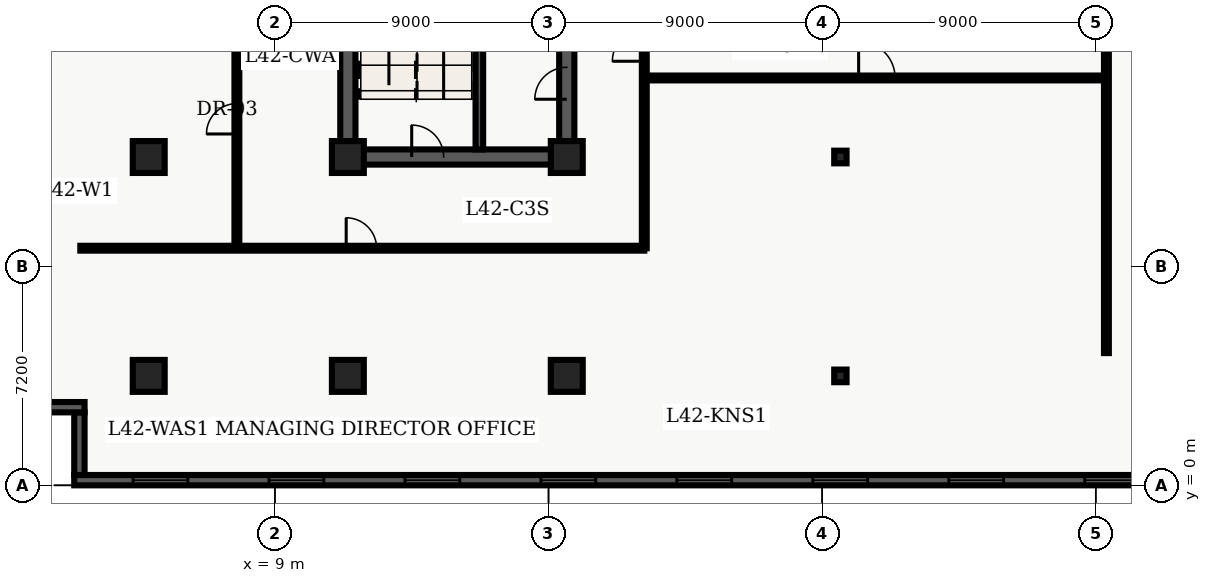
"""IFC4 building model, lengths in metres.
Left out: names, types, materials, properties, quantities, classifications, styles, units other than length and angle.
Written with IfcOpenShell. Run it as: python <this file> out.ifc"""

import sys

from ifc_helpers import new_model, entity, si_unit, converted_unit, direction, frame, origin_with_axes, origin_2d_with_axis, place, context, subcontext, project, spatial, polyline, rectangle, i_section, outline, extrude, element, fill, save


model = new_model("IFC4")
c1 = context("Model", 3, precision=1e-05, world=origin_with_axes(), true_north=direction((0.0, 1.0)))
c2 = subcontext(c1, "Body", "Model", "MODEL_VIEW")
j1 = project(units=[si_unit("LENGTHUNIT", "METRE"), converted_unit("PLANEANGLEUNIT", "DEGREE", entity("IfcPlaneAngleMeasure", 0.017), si_unit("PLANEANGLEUNIT", "RADIAN"), dimensions=[0, 0, 0, 0, 0, 0, 0])], contexts=[c1])
p1 = place(None, origin_with_axes())
s1 = spatial("IfcSite", under=j1, at=p1, CompositionType="ELEMENT")
p2 = place(p1, origin_with_axes())
s2 = spatial("IfcBuilding", under=s1, at=p2, CompositionType="ELEMENT")
p3 = place(p2, frame((0.0, 0.0, 171.9), z_axis=(0.0, 0.0, 1.0), x_axis=(1.0, 0.0, 0.0)))
s3 = spatial("IfcBuildingStorey", under=s2, at=p3, CompositionType="ELEMENT", Elevation=171.9)
p4 = place(p3, frame((11.4, 10.8, 0.0), z_axis=(0.0, 0.0, 1.0), x_axis=(0.0, 1.0, 0.0)))
e1 = element("IfcWall", 1, at=p4, inside=s3, PredefinedType="SHEAR", context=c2, shape_type="SweptSolid", body=[
    extrude(outline(polyline([(0.0, -0.25), (27.0, -0.25), (27.0, 0.25), (0.0, 0.25), (0.0, -0.25)])), origin_with_axes(), (0.0, 0.0, 1.0), 3.66),
])
p5 = place(p3, frame((11.4, 10.8, 0.0), z_axis=(0.0, 0.0, 1.0), x_axis=(1.0, 0.0, 0.0)))
e2 = element("IfcWall", 2, at=p5, inside=s3, PredefinedType="SHEAR", context=c2, shape_type="SweptSolid", body=[
    extrude(outline(polyline([(0.0, -0.25), (7.2, -0.25), (7.2, 0.25), (0.0, 0.25), (0.0, -0.25)])), origin_with_axes(), (0.0, 0.0, 1.0), 3.66),
])
p6 = place(p5, frame((2.625, 0.0, 0.0), z_axis=(0.0, 0.0, 1.0), x_axis=(1.0, 0.0, 0.0)))
e3 = element("IfcOpeningElement", 3, at=p6, cuts=e2, PredefinedType="OPENING", context=c2, shape_type="SweptSolid", body=[
    extrude(rectangle(XDim=1.05, YDim=0.52, at=origin_2d_with_axis()), origin_with_axes(), (0.0, 0.0, 1.0), 2.15),
])
p7 = place(p3, frame((18.6, 10.8, 0.0), z_axis=(0.0, 0.0, 1.0), x_axis=(0.0, 1.0, 0.0)))
e4 = element("IfcWall", 4, at=p7, inside=s3, PredefinedType="SHEAR", context=c2, shape_type="SweptSolid", body=[
    extrude(outline(polyline([(0.0, -0.25), (13.5, -0.25), (13.5, 0.25), (0.0, 0.25), (0.0, -0.25)])), origin_with_axes(), (0.0, 0.0, 1.0), 3.66),
])
p8 = place(p7, frame((11.125, 0.0, 0.0), z_axis=(0.0, 0.0, 1.0), x_axis=(1.0, 0.0, 0.0)))
e5 = element("IfcOpeningElement", 5, at=p8, cuts=e4, PredefinedType="OPENING", context=c2, shape_type="SweptSolid", body=[
    extrude(rectangle(XDim=1.05, YDim=0.52, at=origin_2d_with_axis()), origin_with_axes(), (0.0, 0.0, 1.0), 2.15),
])
p9 = place(p7, frame((2.425, 0.0, 0.0), z_axis=(0.0, 0.0, 1.0), x_axis=(1.0, 0.0, 0.0)))
e6 = element("IfcOpeningElement", 6, at=p9, cuts=e4, PredefinedType="OPENING", context=c2, shape_type="SweptSolid", body=[
    extrude(rectangle(XDim=1.05, YDim=0.52, at=origin_2d_with_axis()), origin_with_axes(), (0.0, 0.0, 1.0), 2.15),
])
p10 = place(p7, frame((6.725, 0.0, 0.0), z_axis=(0.0, 0.0, 1.0), x_axis=(1.0, 0.0, 0.0)))
e7 = element("IfcOpeningElement", 7, at=p10, cuts=e4, PredefinedType="OPENING", context=c2, shape_type="SweptSolid", body=[
    extrude(rectangle(XDim=1.05, YDim=0.52, at=origin_2d_with_axis()), origin_with_axes(), (0.0, 0.0, 1.0), 2.15),
])
p11 = place(p3, frame((15.725, 11.05, 0.0), z_axis=(0.0, 0.0, 1.0), x_axis=(0.0, 1.0, 0.0)))
e8 = element("IfcWall", 8, at=p11, inside=s3, PredefinedType="SHEAR", context=c2, shape_type="SweptSolid", body=[
    extrude(outline(polyline([(0.0, -0.125), (8.65, -0.125), (8.65, 0.125), (0.0, 0.125), (0.0, -0.125)])), origin_with_axes(), (0.0, 0.0, 1.0), 3.66),
])
for number, where, z_axis, x_axis in (
    (9, (11.4, 3.6, 0.0), (0.0, 0.0, 1.0), (1.0, 0.0, 0.0)),
    (10, (11.4, 10.8, 0.0), (0.0, 0.0, 1.0), (1.0, 0.0, 0.0)),
    (11, (18.6, 3.6, 0.0), (0.0, 0.0, 1.0), (1.0, 0.0, 0.0)),
    (12, (18.6, 10.8, 0.0), (0.0, 0.0, 1.0), (1.0, 0.0, 0.0)),
    (13, (4.85, 3.6, 0.0), (0.0, 0.0, 1.0), (1.0, 0.0, 0.0)),
    (14, (4.85, 10.8, 0.0), (0.0, 0.0, 1.0), (1.0, 0.0, 0.0)),
):
    element("IfcColumn", number, at=place(p3, frame(where, z_axis=z_axis, x_axis=x_axis)), inside=s3, PredefinedType="COLUMN", context=c2, shape_type="SweptSolid", body=[
        extrude(rectangle(XDim=1.05, YDim=1.05, at=origin_2d_with_axis()), origin_with_axes(), (0.0, 0.0, 1.0), 3.9),
    ])
for number, where, z_axis, x_axis in (
    (15, (27.6, 3.6, 0.0), (0.0, 0.0, 1.0), (1.0, 0.0, 0.0)),
    (16, (27.6, 10.8, 0.0), (0.0, 0.0, 1.0), (1.0, 0.0, 0.0)),
):
    element("IfcColumn", number, at=place(p3, frame(where, z_axis=z_axis, x_axis=x_axis)), inside=s3, PredefinedType="COLUMN", context=c2, shape_type="SweptSolid", body=[
        extrude(i_section(OverallWidth=0.406, OverallDepth=0.416, WebThickness=0.03, FlangeThickness=0.048, FilletRadius=0.022, at=origin_2d_with_axis()), origin_with_axes(), (0.0, 0.0, 1.0), 3.9),
    ])
p12 = place(p3, frame((2.6, 7.8, 0.0), z_axis=(0.0, 0.0, 1.0), x_axis=(1.0, 0.0, 0.0)))
e17 = element("IfcWall", 17, at=p12, inside=s3, PredefinedType="PARTITIONING", context=c2, shape_type="SweptSolid", body=[
    extrude(outline(polyline([(0.0, -0.08), (18.55, -0.08), (18.55, 0.08), (0.0, 0.08), (0.0, -0.08)])), origin_with_axes(), (0.0, 0.0, 1.0), 2.7),
])
p13 = place(p12, frame((9.245, 0.0, 0.0), z_axis=(0.0, 0.0, 1.0), x_axis=(1.0, 0.0, 0.0)))
e18 = element("IfcOpeningElement", 18, at=p13, cuts=e17, PredefinedType="OPENING", context=c2, shape_type="SweptSolid", body=[
    extrude(rectangle(XDim=1.0, YDim=0.18, at=origin_2d_with_axis()), origin_with_axes(), (0.0, 0.0, 1.0), 2.15),
])
p14 = place(p3, frame((21.15, 7.8, 0.0), z_axis=(0.0, 0.0, 1.0), x_axis=(0.0, 1.0, 0.0)))
e19 = element("IfcWall", 19, at=p14, inside=s3, PredefinedType="PARTITIONING", context=c2, shape_type="SweptSolid", body=[
    extrude(outline(polyline([(0.0, -0.08), (32.7, -0.08), (32.7, 0.08), (0.0, 0.08), (0.0, -0.08)])), origin_with_axes(), (0.0, 0.0, 1.0), 2.7),
])
p15 = place(p14, frame((15.766, 0.0, 0.0), z_axis=(0.0, 0.0, 1.0), x_axis=(1.0, 0.0, 0.0)))
e20 = element("IfcOpeningElement", 20, at=p15, cuts=e19, PredefinedType="OPENING", context=c2, shape_type="SweptSolid", body=[
    extrude(rectangle(XDim=1.0, YDim=0.18, at=origin_2d_with_axis()), origin_with_axes(), (0.0, 0.0, 1.0), 2.15),
])
p16 = place(p14, frame((19.696, 0.0, 0.0), z_axis=(0.0, 0.0, 1.0), x_axis=(1.0, 0.0, 0.0)))
e21 = element("IfcOpeningElement", 21, at=p16, cuts=e19, PredefinedType="OPENING", context=c2, shape_type="SweptSolid", body=[
    extrude(rectangle(XDim=1.0, YDim=0.18, at=origin_2d_with_axis()), origin_with_axes(), (0.0, 0.0, 1.0), 2.15),
])
p17 = place(p14, frame((24.223, 0.0, 0.0), z_axis=(0.0, 0.0, 1.0), x_axis=(1.0, 0.0, 0.0)))
e22 = element("IfcOpeningElement", 22, at=p17, cuts=e19, PredefinedType="OPENING", context=c2, shape_type="SweptSolid", body=[
    extrude(rectangle(XDim=1.0, YDim=0.18, at=origin_2d_with_axis()), origin_with_axes(), (0.0, 0.0, 1.0), 2.15),
])
p18 = place(p14, frame((29.613, 0.0, 0.0), z_axis=(0.0, 0.0, 1.0), x_axis=(1.0, 0.0, 0.0)))
e23 = element("IfcOpeningElement", 23, at=p18, cuts=e19, PredefinedType="OPENING", context=c2, shape_type="SweptSolid", body=[
    extrude(rectangle(XDim=1.0, YDim=0.18, at=origin_2d_with_axis()), origin_with_axes(), (0.0, 0.0, 1.0), 2.15),
])
p19 = place(p14, frame((6.675, 0.0, 0.0), z_axis=(0.0, 0.0, 1.0), x_axis=(1.0, 0.0, 0.0)))
e24 = element("IfcOpeningElement", 24, at=p19, cuts=e19, PredefinedType="OPENING", context=c2, shape_type="SweptSolid", body=[
    extrude(rectangle(XDim=1.05, YDim=0.18, at=origin_2d_with_axis()), origin_with_axes(), (0.0, 0.0, 1.0), 2.15),
])
p20 = place(p3, frame((7.75, 7.8, 0.0), z_axis=(0.0, 0.0, 1.0), x_axis=(0.0, 1.0, 0.0)))
e25 = element("IfcWall", 25, at=p20, inside=s3, PredefinedType="PARTITIONING", context=c2, shape_type="SweptSolid", body=[
    extrude(outline(polyline([(0.0, -0.08), (32.7, -0.08), (32.7, 0.08), (0.0, 0.08), (0.0, -0.08)])), origin_with_axes(), (0.0, 0.0, 1.0), 2.7),
])
p21 = place(p20, frame((4.258, 0.0, 0.0), z_axis=(0.0, 0.0, 1.0), x_axis=(1.0, 0.0, 0.0)))
e26 = element("IfcOpeningElement", 26, at=p21, cuts=e25, PredefinedType="OPENING", context=c2, shape_type="SweptSolid", body=[
    extrude(rectangle(XDim=1.0, YDim=0.18, at=origin_2d_with_axis()), origin_with_axes(), (0.0, 0.0, 1.0), 2.15),
])
p22 = place(p20, frame((13.551, 0.0, 0.0), z_axis=(0.0, 0.0, 1.0), x_axis=(1.0, 0.0, 0.0)))
e27 = element("IfcOpeningElement", 27, at=p22, cuts=e25, PredefinedType="OPENING", context=c2, shape_type="SweptSolid", body=[
    extrude(rectangle(XDim=1.0, YDim=0.18, at=origin_2d_with_axis()), origin_with_axes(), (0.0, 0.0, 1.0), 2.15),
])
p23 = place(p20, frame((25.643, 0.0, 0.0), z_axis=(0.0, 0.0, 1.0), x_axis=(1.0, 0.0, 0.0)))
e28 = element("IfcOpeningElement", 28, at=p23, cuts=e25, PredefinedType="OPENING", context=c2, shape_type="SweptSolid", body=[
    extrude(rectangle(XDim=1.0, YDim=0.18, at=origin_2d_with_axis()), origin_with_axes(), (0.0, 0.0, 1.0), 2.15),
])
p24 = place(p3, frame((21.15, 13.4, 0.0), z_axis=(0.0, 0.0, 1.0), x_axis=(1.0, 0.0, 0.0)))
e29 = element("IfcWall", 29, at=p24, inside=s3, PredefinedType="PARTITIONING", context=c2, shape_type="SweptSolid", body=[
    extrude(outline(polyline([(0.0, -0.08), (15.2, -0.08), (15.2, 0.08), (0.0, 0.08), (0.0, -0.08)])), origin_with_axes(), (0.0, 0.0, 1.0), 2.7),
])
p25 = place(p24, frame((7.65, 0.0, 0.0), z_axis=(0.0, 0.0, 1.0), x_axis=(1.0, 0.0, 0.0)))
e30 = element("IfcOpeningElement", 30, at=p25, cuts=e29, PredefinedType="OPENING", context=c2, shape_type="SweptSolid", body=[
    extrude(rectangle(XDim=1.2, YDim=0.18, at=origin_2d_with_axis()), origin_with_axes(), (0.0, 0.0, 1.0), 2.2),
])
p26 = place(p3, frame((36.35, 4.35, 0.0), z_axis=(0.0, 0.0, 1.0), x_axis=(0.0, 1.0, 0.0)))
e31 = element("IfcWall", 31, at=p26, inside=s3, PredefinedType="PARTITIONING", context=c2, shape_type="SweptSolid", body=[
    extrude(outline(polyline([(0.0, -0.08), (16.95, -0.08), (16.95, 0.08), (0.0, 0.08), (0.0, -0.08)])), origin_with_axes(), (0.0, 0.0, 1.0), 2.7),
])
p27 = place(p3, frame((57.26, 0.17, 0.0), z_axis=(0.0, 0.0, 1.0), x_axis=(-1.0, 0.0, 0.0)))
e32 = element("IfcWall", 32, at=p27, inside=s3, PredefinedType="SOLIDWALL", context=c2, shape_type="SweptSolid", body=[
    extrude(outline(polyline([(0.0, -0.17), (54.86, -0.17), (54.86, 0.17), (0.0, 0.17), (0.0, -0.17)])), origin_with_axes(), (0.0, 0.0, 1.0), 3.66),
])
p28 = place(p27, frame((2.836, 0.0, 0.45), z_axis=(0.0, 0.0, 1.0), x_axis=(1.0, 0.0, 0.0)))
e33 = element("IfcOpeningElement", 33, at=p28, cuts=e32, PredefinedType="OPENING", context=c2, shape_type="SweptSolid", body=[
    extrude(rectangle(XDim=1.8, YDim=0.36, at=origin_2d_with_axis()), origin_with_axes(), (0.0, 0.0, 1.0), 2.1),
])
p29 = place(p27, frame((7.307, 0.0, 0.45), z_axis=(0.0, 0.0, 1.0), x_axis=(1.0, 0.0, 0.0)))
e34 = element("IfcOpeningElement", 34, at=p29, cuts=e32, PredefinedType="OPENING", context=c2, shape_type="SweptSolid", body=[
    extrude(rectangle(XDim=1.8, YDim=0.36, at=origin_2d_with_axis()), origin_with_axes(), (0.0, 0.0, 1.0), 2.1),
])
p30 = place(p27, frame((11.779, 0.0, 0.45), z_axis=(0.0, 0.0, 1.0), x_axis=(1.0, 0.0, 0.0)))
e35 = element("IfcOpeningElement", 35, at=p30, cuts=e32, PredefinedType="OPENING", context=c2, shape_type="SweptSolid", body=[
    extrude(rectangle(XDim=1.8, YDim=0.36, at=origin_2d_with_axis()), origin_with_axes(), (0.0, 0.0, 1.0), 2.1),
])
p31 = place(p27, frame((16.251, 0.0, 0.45), z_axis=(0.0, 0.0, 1.0), x_axis=(1.0, 0.0, 0.0)))
e36 = element("IfcOpeningElement", 36, at=p31, cuts=e32, PredefinedType="OPENING", context=c2, shape_type="SweptSolid", body=[
    extrude(rectangle(XDim=1.8, YDim=0.36, at=origin_2d_with_axis()), origin_with_axes(), (0.0, 0.0, 1.0), 2.1),
])
p32 = place(p27, frame((20.723, 0.0, 0.45), z_axis=(0.0, 0.0, 1.0), x_axis=(1.0, 0.0, 0.0)))
e37 = element("IfcOpeningElement", 37, at=p32, cuts=e32, PredefinedType="OPENING", context=c2, shape_type="SweptSolid", body=[
    extrude(rectangle(XDim=1.8, YDim=0.36, at=origin_2d_with_axis()), origin_with_axes(), (0.0, 0.0, 1.0), 2.1),
])
p33 = place(p27, frame((25.194, 0.0, 0.45), z_axis=(0.0, 0.0, 1.0), x_axis=(1.0, 0.0, 0.0)))
e38 = element("IfcOpeningElement", 38, at=p33, cuts=e32, PredefinedType="OPENING", context=c2, shape_type="SweptSolid", body=[
    extrude(rectangle(XDim=1.8, YDim=0.36, at=origin_2d_with_axis()), origin_with_axes(), (0.0, 0.0, 1.0), 2.1),
])
p34 = place(p27, frame((29.666, 0.0, 0.45), z_axis=(0.0, 0.0, 1.0), x_axis=(1.0, 0.0, 0.0)))
e39 = element("IfcOpeningElement", 39, at=p34, cuts=e32, PredefinedType="OPENING", context=c2, shape_type="SweptSolid", body=[
    extrude(rectangle(XDim=1.8, YDim=0.36, at=origin_2d_with_axis()), origin_with_axes(), (0.0, 0.0, 1.0), 2.1),
])
p35 = place(p27, frame((34.138, 0.0, 0.45), z_axis=(0.0, 0.0, 1.0), x_axis=(1.0, 0.0, 0.0)))
e40 = element("IfcOpeningElement", 40, at=p35, cuts=e32, PredefinedType="OPENING", context=c2, shape_type="SweptSolid", body=[
    extrude(rectangle(XDim=1.8, YDim=0.36, at=origin_2d_with_axis()), origin_with_axes(), (0.0, 0.0, 1.0), 2.1),
])
p36 = place(p27, frame((38.609, 0.0, 0.45), z_axis=(0.0, 0.0, 1.0), x_axis=(1.0, 0.0, 0.0)))
e41 = element("IfcOpeningElement", 41, at=p36, cuts=e32, PredefinedType="OPENING", context=c2, shape_type="SweptSolid", body=[
    extrude(rectangle(XDim=1.8, YDim=0.36, at=origin_2d_with_axis()), origin_with_axes(), (0.0, 0.0, 1.0), 2.1),
])
p37 = place(p27, frame((43.081, 0.0, 0.45), z_axis=(0.0, 0.0, 1.0), x_axis=(1.0, 0.0, 0.0)))
e42 = element("IfcOpeningElement", 42, at=p37, cuts=e32, PredefinedType="OPENING", context=c2, shape_type="SweptSolid", body=[
    extrude(rectangle(XDim=1.8, YDim=0.36, at=origin_2d_with_axis()), origin_with_axes(), (0.0, 0.0, 1.0), 2.1),
])
p38 = place(p27, frame((47.553, 0.0, 0.45), z_axis=(0.0, 0.0, 1.0), x_axis=(1.0, 0.0, 0.0)))
e43 = element("IfcOpeningElement", 43, at=p38, cuts=e32, PredefinedType="OPENING", context=c2, shape_type="SweptSolid", body=[
    extrude(rectangle(XDim=1.8, YDim=0.36, at=origin_2d_with_axis()), origin_with_axes(), (0.0, 0.0, 1.0), 2.1),
])
p39 = place(p27, frame((52.024, 0.0, 0.45), z_axis=(0.0, 0.0, 1.0), x_axis=(1.0, 0.0, 0.0)))
e44 = element("IfcOpeningElement", 44, at=p39, cuts=e32, PredefinedType="OPENING", context=c2, shape_type="SweptSolid", body=[
    extrude(rectangle(XDim=1.8, YDim=0.36, at=origin_2d_with_axis()), origin_with_axes(), (0.0, 0.0, 1.0), 2.1),
])
p40 = place(p3, frame((2.57, 0.34, 0.0), z_axis=(0.0, 0.0, 1.0), x_axis=(0.0, 1.0, 0.0)))
e45 = element("IfcWall", 45, at=p40, inside=s3, PredefinedType="SOLIDWALL", context=c2, shape_type="SweptSolid", body=[
    extrude(outline(polyline([(0.0, -0.17), (2.06, -0.17), (2.06, 0.17), (0.0, 0.17), (0.0, -0.17)])), origin_with_axes(), (0.0, 0.0, 1.0), 3.66),
])
p41 = place(p3, frame((2.74, 2.57, 0.0), z_axis=(0.0, 0.0, 1.0), x_axis=(-1.0, 0.0, 0.0)))
e46 = element("IfcWall", 46, at=p41, inside=s3, PredefinedType="SOLIDWALL", context=c2, shape_type="SweptSolid", body=[
    extrude(outline(polyline([(0.0, -0.17), (2.74, -0.17), (2.74, 0.17), (0.0, 0.17), (0.0, -0.17)])), origin_with_axes(), (0.0, 0.0, 1.0), 3.66),
])
p42 = place(p5, frame((2.625, 0.0, 0.0), z_axis=(0.0, 0.0, 1.0), x_axis=(1.0, 0.0, 0.0)))
e47 = element("IfcDoor", 47, at=p42, inside=s3, OperationType="SINGLE_SWING_LEFT", PredefinedType="DOOR", context=c2, shape_type="SweptSolid", body=[
    extrude(rectangle(XDim=1.05, YDim=0.09, at=origin_2d_with_axis()), origin_with_axes(), (0.0, 0.0, 1.0), 2.15),
])
fill(e3, e47)
p43 = place(p7, frame((2.425, 0.0, 0.0), z_axis=(0.0, 0.0, 1.0), x_axis=(1.0, 0.0, 0.0)))
e48 = element("IfcDoor", 48, at=p43, inside=s3, OperationType="SINGLE_SWING_LEFT", PredefinedType="DOOR", context=c2, shape_type="SweptSolid", body=[
    extrude(rectangle(XDim=1.05, YDim=0.09, at=origin_2d_with_axis()), origin_with_axes(), (0.0, 0.0, 1.0), 2.15),
])
fill(e6, e48)
p44 = place(p20, frame((4.258, 0.0, 0.0), z_axis=(0.0, 0.0, 1.0), x_axis=(1.0, 0.0, 0.0)))
e49 = element("IfcDoor", 49, at=p44, inside=s3, OperationType="SINGLE_SWING_LEFT", PredefinedType="DOOR", context=c2, shape_type="SweptSolid", body=[
    extrude(rectangle(XDim=1.0, YDim=0.09, at=origin_2d_with_axis()), origin_with_axes(), (0.0, 0.0, 1.0), 2.15),
])
fill(e26, e49)
p45 = place(p12, frame((9.245, 0.0, 0.0), z_axis=(0.0, 0.0, 1.0), x_axis=(1.0, 0.0, 0.0)))
e50 = element("IfcDoor", 50, at=p45, inside=s3, OperationType="SINGLE_SWING_LEFT", PredefinedType="DOOR", context=c2, shape_type="SweptSolid", body=[
    extrude(rectangle(XDim=1.0, YDim=0.09, at=origin_2d_with_axis()), origin_with_axes(), (0.0, 0.0, 1.0), 2.15),
])
fill(e18, e50)
p46 = place(p14, frame((6.675, 0.0, 0.0), z_axis=(0.0, 0.0, 1.0), x_axis=(1.0, 0.0, 0.0)))
e51 = element("IfcDoor", 51, at=p46, inside=s3, OperationType="SINGLE_SWING_LEFT", PredefinedType="DOOR", context=c2, shape_type="SweptSolid", body=[
    extrude(rectangle(XDim=1.05, YDim=0.09, at=origin_2d_with_axis()), origin_with_axes(), (0.0, 0.0, 1.0), 2.15),
])
fill(e24, e51)
p47 = place(p24, frame((7.65, 0.0, 0.0), z_axis=(0.0, 0.0, 1.0), x_axis=(1.0, 0.0, 0.0)))
e52 = element("IfcDoor", 52, at=p47, inside=s3, OperationType="SINGLE_SWING_LEFT", PredefinedType="DOOR", context=c2, shape_type="SweptSolid", body=[
    extrude(rectangle(XDim=1.2, YDim=0.09, at=origin_2d_with_axis()), origin_with_axes(), (0.0, 0.0, 1.0), 2.2),
])
fill(e30, e52)
p48 = place(p27, frame((20.723, 0.0, 0.45), z_axis=(0.0, 0.0, 1.0), x_axis=(1.0, 0.0, 0.0)))
e53 = element("IfcWindow", 53, at=p48, inside=s3, PredefinedType="WINDOW", context=c2, shape_type="SweptSolid", body=[
    extrude(rectangle(XDim=1.8, YDim=0.09, at=origin_2d_with_axis()), origin_with_axes(), (0.0, 0.0, 1.0), 2.1),
])
fill(e37, e53)
p49 = place(p27, frame((25.194, 0.0, 0.45), z_axis=(0.0, 0.0, 1.0), x_axis=(1.0, 0.0, 0.0)))
e54 = element("IfcWindow", 54, at=p49, inside=s3, PredefinedType="WINDOW", context=c2, shape_type="SweptSolid", body=[
    extrude(rectangle(XDim=1.8, YDim=0.09, at=origin_2d_with_axis()), origin_with_axes(), (0.0, 0.0, 1.0), 2.1),
])
fill(e38, e54)
p50 = place(p27, frame((29.666, 0.0, 0.45), z_axis=(0.0, 0.0, 1.0), x_axis=(1.0, 0.0, 0.0)))
e55 = element("IfcWindow", 55, at=p50, inside=s3, PredefinedType="WINDOW", context=c2, shape_type="SweptSolid", body=[
    extrude(rectangle(XDim=1.8, YDim=0.09, at=origin_2d_with_axis()), origin_with_axes(), (0.0, 0.0, 1.0), 2.1),
])
fill(e39, e55)
p51 = place(p27, frame((34.138, 0.0, 0.45), z_axis=(0.0, 0.0, 1.0), x_axis=(1.0, 0.0, 0.0)))
e56 = element("IfcWindow", 56, at=p51, inside=s3, PredefinedType="WINDOW", context=c2, shape_type="SweptSolid", body=[
    extrude(rectangle(XDim=1.8, YDim=0.09, at=origin_2d_with_axis()), origin_with_axes(), (0.0, 0.0, 1.0), 2.1),
])
fill(e40, e56)
p52 = place(p27, frame((38.609, 0.0, 0.45), z_axis=(0.0, 0.0, 1.0), x_axis=(1.0, 0.0, 0.0)))
e57 = element("IfcWindow", 57, at=p52, inside=s3, PredefinedType="WINDOW", context=c2, shape_type="SweptSolid", body=[
    extrude(rectangle(XDim=1.8, YDim=0.09, at=origin_2d_with_axis()), origin_with_axes(), (0.0, 0.0, 1.0), 2.1),
])
fill(e41, e57)
p53 = place(p27, frame((43.081, 0.0, 0.45), z_axis=(0.0, 0.0, 1.0), x_axis=(1.0, 0.0, 0.0)))
e58 = element("IfcWindow", 58, at=p53, inside=s3, PredefinedType="WINDOW", context=c2, shape_type="SweptSolid", body=[
    extrude(rectangle(XDim=1.8, YDim=0.09, at=origin_2d_with_axis()), origin_with_axes(), (0.0, 0.0, 1.0), 2.1),
])
fill(e42, e58)
p54 = place(p27, frame((47.553, 0.0, 0.45), z_axis=(0.0, 0.0, 1.0), x_axis=(1.0, 0.0, 0.0)))
e59 = element("IfcWindow", 59, at=p54, inside=s3, PredefinedType="WINDOW", context=c2, shape_type="SweptSolid", body=[
    extrude(rectangle(XDim=1.8, YDim=0.09, at=origin_2d_with_axis()), origin_with_axes(), (0.0, 0.0, 1.0), 2.1),
])
fill(e43, e59)
p55 = place(p27, frame((52.024, 0.0, 0.45), z_axis=(0.0, 0.0, 1.0), x_axis=(1.0, 0.0, 0.0)))
e60 = element("IfcWindow", 60, at=p55, inside=s3, PredefinedType="WINDOW", context=c2, shape_type="SweptSolid", body=[
    extrude(rectangle(XDim=1.8, YDim=0.09, at=origin_2d_with_axis()), origin_with_axes(), (0.0, 0.0, 1.0), 2.1),
])
fill(e44, e60)
save(model, sys.argv[1])
